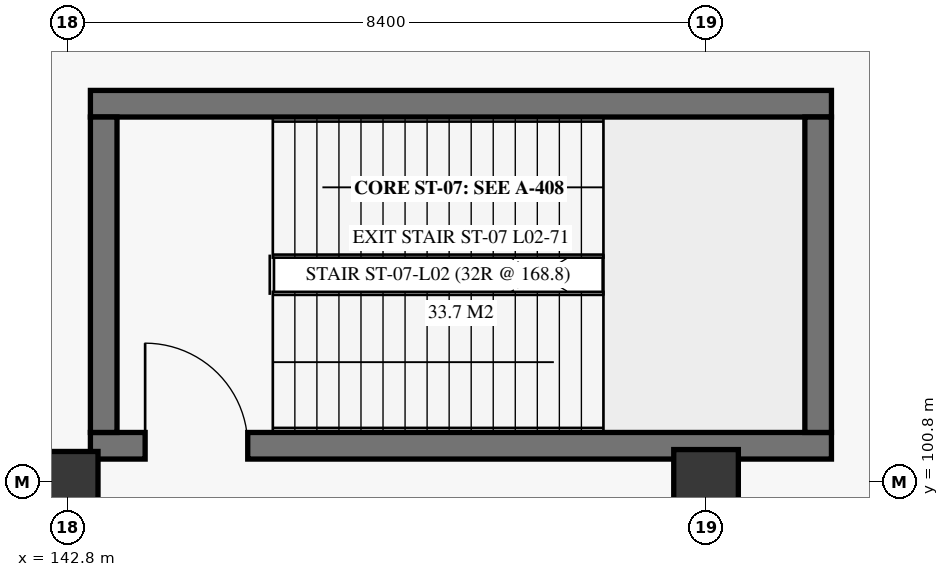
"""IFC4 building model, lengths in metres.
Left out: names, types, materials, properties, quantities, classifications, styles, units other than length and angle.
Written with IfcOpenShell. Run it as: python <this file> out.ifc"""

import sys

from ifc_helpers import new_model, si_unit, direction, frame, frame_2d, origin, origin_2d, place, context, subcontext, project, spatial, rectangle, extrude, element, fill, save


model = new_model("IFC4")
c1 = context("Model", 3, precision=1e-05, world=origin(), true_north=direction((0.0, 1.0)))
c2 = subcontext(c1, "Body", "Model", "MODEL_VIEW")
j1 = project(units=[si_unit("LENGTHUNIT", "METRE"), si_unit("PLANEANGLEUNIT", "RADIAN")], contexts=[c1])
p1 = place(None, origin())
s1 = spatial("IfcSite", under=j1, at=p1, CompositionType="ELEMENT")
p2 = place(p1, origin())
s2 = spatial("IfcBuilding", under=s1, at=p2, CompositionType="ELEMENT")
p3 = place(p2, frame((0.0, 0.0, 6.0)))
s3 = spatial("IfcBuildingStorey", under=s2, at=p3, CompositionType="ELEMENT", Elevation=6.0)
p4 = place(p3, frame((142.8, 100.8, 0.0), z_axis=(0.0, 0.0, 1.0), x_axis=(1.0, 0.0, 0.0)))
e1 = element("IfcColumn", 1, at=p4, inside=s3, PredefinedType="COLUMN", context=c2, shape_type="SweptSolid", body=[
    extrude(rectangle(XDim=0.8, YDim=0.8, at=origin_2d()), origin(), (0.0, 0.0, 1.0), 5.1),
])
p5 = place(p3, frame((151.2, 100.8, 0.0), z_axis=(0.0, 0.0, 1.0), x_axis=(1.0, 0.0, 0.0)))
e2 = element("IfcColumn", 2, at=p5, inside=s3, PredefinedType="COLUMN", context=c2, shape_type="SweptSolid", body=[
    extrude(rectangle(XDim=0.85, YDim=0.85, at=origin_2d()), origin(), (0.0, 0.0, 1.0), 5.1),
])
p6 = place(p3, frame((143.1, 101.275, 0.0), z_axis=(0.0, 0.0, 1.0), x_axis=(1.0, 0.0, 0.0)))
e3 = element("IfcWall", 3, at=p6, inside=s3, PredefinedType="SHEAR", context=c2, shape_type="SweptSolid", body=[
    extrude(rectangle(XDim=9.75, YDim=0.35, at=frame_2d((4.875, 0.0))), origin(), (0.0, 0.0, 1.0), 5.1),
])
p7 = place(p6, frame((0.72, 0.0, 0.0)))
e4 = element("IfcOpeningElement", 4, at=p7, cuts=e3, PredefinedType="OPENING", context=c2, shape_type="SweptSolid", body=[
    extrude(rectangle(XDim=1.35, YDim=2.25, at=frame_2d((0.675, 1.125))), frame((0.0, 0.185, 0.0), z_axis=(0.0, -1.0, 0.0), x_axis=(1.0, 0.0, 0.0)), (0.0, 0.0, 1.0), 0.37),
])
p8 = place(p3, frame((143.1, 105.775, 0.0), z_axis=(0.0, 0.0, 1.0), x_axis=(1.0, 0.0, 0.0)))
e5 = element("IfcWall", 5, at=p8, inside=s3, PredefinedType="SHEAR", context=c2, shape_type="SweptSolid", body=[
    extrude(rectangle(XDim=9.75, YDim=0.35, at=frame_2d((4.875, 0.0))), origin(), (0.0, 0.0, 1.0), 5.1),
])
for number, where, z_axis, x_axis in (
    (6, (143.275, 101.45, 0.0), (0.0, 0.0, 1.0), (0.0, 1.0, 0.0)),
    (7, (152.675, 101.45, 0.0), (0.0, 0.0, 1.0), (0.0, 1.0, 0.0)),
):
    element("IfcWall", number, at=place(p3, frame(where, z_axis=z_axis, x_axis=x_axis)), inside=s3, PredefinedType="SHEAR", context=c2, shape_type="SweptSolid", body=[
        extrude(rectangle(XDim=4.15, YDim=0.35, at=frame_2d((2.075, 0.0))), origin(), (0.0, 0.0, 1.0), 5.1),
    ])
p9 = place(p7, origin())
e8 = element("IfcDoor", 8, at=p9, inside=s3, OperationType="SINGLE_SWING_LEFT", PredefinedType="DOOR", context=c2, shape_type="SweptSolid", body=[
    extrude(rectangle(XDim=1.35, YDim=2.25, at=frame_2d((0.675, 1.125))), frame((0.0, 0.025, 0.0), z_axis=(0.0, -1.0, 0.0), x_axis=(1.0, 0.0, 0.0)), (0.0, 0.0, 1.0), 0.05),
])
fill(e4, e8)
save(model, sys.argv[1])
